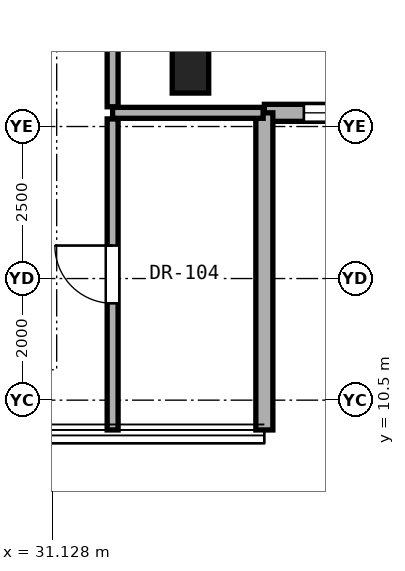
"""IFC4 building model, lengths in metres.
Left out: names, types, materials, properties, quantities, classifications, styles, units other than length and angle.
Written with IfcOpenShell. Run it as: python <this file> out.ifc"""

import sys

from ifc_helpers import new_model, si_unit, direction, frame, frame_2d, origin, origin_2d, place, context, subcontext, project, spatial, rectangle, extrude, element, fill, save


model = new_model("IFC4")
c1 = context("Model", 3, precision=1e-05, world=origin(), true_north=direction((0.0, 1.0)))
c2 = subcontext(c1, "Body", "Model", "MODEL_VIEW")
j1 = project(units=[si_unit("LENGTHUNIT", "METRE"), si_unit("PLANEANGLEUNIT", "RADIAN")], contexts=[c1])
p1 = place(None, origin())
s1 = spatial("IfcSite", under=j1, at=p1, CompositionType="ELEMENT")
p2 = place(p1, origin())
s2 = spatial("IfcBuilding", under=s1, at=p2, CompositionType="ELEMENT")
p3 = place(p2, frame((0.0, 0.0, 183.65)))
s3 = spatial("IfcBuildingStorey", under=s2, at=p3, CompositionType="ELEMENT", Elevation=183.65)
p4 = place(p3, frame((33.4, 16.0, 0.0), z_axis=(0.0, 0.0, 1.0), x_axis=(1.0, 0.0, 0.0)))
e1 = element("IfcColumn", 1, at=p4, inside=s3, PredefinedType="PILASTER", context=c2, shape_type="SweptSolid", body=[
    extrude(rectangle(XDim=0.6, YDim=0.9, at=origin_2d()), origin(), (0.0, 0.0, 1.0), 3.25),
])
p5 = place(p3, frame((34.615, 15.225, 0.0), z_axis=(0.0, 0.0, 1.0), x_axis=(1.0, 0.0, 0.0)))
e2 = element("IfcWall", 2, at=p5, inside=s3, PredefinedType="SOLIDWALL", context=c2, shape_type="SweptSolid", body=[
    extrude(rectangle(XDim=5.215, YDim=0.28, at=frame_2d((2.607, 0.0))), origin(), (0.0, 0.0, 1.0), 3.03),
])
p6 = place(p5, frame((0.65, 0.0, 0.85)))
e3 = element("IfcOpeningElement", 3, at=p6, cuts=e2, PredefinedType="OPENING", context=c2, shape_type="SweptSolid", body=[
    extrude(rectangle(XDim=1.1, YDim=2.0, at=frame_2d((0.55, 1.0))), frame((0.0, 0.15, 0.0), z_axis=(0.0, -1.0, 0.0), x_axis=(1.0, 0.0, 0.0)), (0.0, 0.0, 1.0), 0.3),
])
p7 = place(p3, frame((34.615, 10.01, 0.0), z_axis=(0.0, 0.0, 1.0), x_axis=(0.0, 1.0, 0.0)))
e4 = element("IfcWall", 4, at=p7, inside=s3, PredefinedType="SOLIDWALL", context=c2, shape_type="SweptSolid", body=[
    extrude(rectangle(XDim=5.215, YDim=0.28, at=frame_2d((2.607, 0.0))), origin(), (0.0, 0.0, 1.0), 3.03),
])
p8 = place(p3, frame((32.12, 15.225, 0.0), z_axis=(0.0, 0.0, 1.0), x_axis=(1.0, 0.0, 0.0)))
e5 = element("IfcWall", 5, at=p8, inside=s3, PredefinedType="PARTITIONING", context=c2, shape_type="SweptSolid", body=[
    extrude(rectangle(XDim=2.475, YDim=0.18, at=frame_2d((1.237, 0.0))), origin(), (0.0, 0.0, 1.0), 3.05),
])
p9 = place(p3, frame((32.12, 10.01, 0.0), z_axis=(0.0, 0.0, 1.0), x_axis=(0.0, 1.0, 0.0)))
e6 = element("IfcWall", 6, at=p9, inside=s3, PredefinedType="PARTITIONING", context=c2, shape_type="SweptSolid", body=[
    extrude(rectangle(XDim=5.115, YDim=0.18, at=frame_2d((2.558, 0.0))), origin(), (0.0, 0.0, 1.0), 3.05),
])
p10 = place(p9, frame((2.083, 0.0, 0.0)))
e7 = element("IfcOpeningElement", 7, at=p10, cuts=e6, PredefinedType="OPENING", context=c2, shape_type="SweptSolid", body=[
    extrude(rectangle(XDim=0.95, YDim=2.15, at=frame_2d((0.475, 1.075))), frame((0.0, 0.1, 0.0), z_axis=(0.0, -1.0, 0.0), x_axis=(1.0, 0.0, 0.0)), (0.0, 0.0, 1.0), 0.2),
])
p11 = place(p3, frame((32.12, 15.325, 0.0), z_axis=(0.0, 0.0, 1.0), x_axis=(0.0, 1.0, 0.0)))
e8 = element("IfcWall", 8, at=p11, inside=s3, PredefinedType="PARTITIONING", context=c2, shape_type="SweptSolid", body=[
    extrude(rectangle(XDim=7.785, YDim=0.18, at=frame_2d((3.893, 0.0))), origin(), (0.0, 0.0, 1.0), 2.442),
])
p12 = place(p11, frame((3.367, 0.0, 0.0)))
e9 = element("IfcOpeningElement", 9, at=p12, cuts=e8, PredefinedType="OPENING", context=c2, shape_type="SweptSolid", body=[
    extrude(rectangle(XDim=1.05, YDim=2.2, at=frame_2d((0.525, 1.1))), frame((0.0, 0.1, 0.0), z_axis=(0.0, -1.0, 0.0), x_axis=(1.0, 0.0, 0.0)), (0.0, 0.0, 1.0), 0.2),
])
p13 = place(p6, origin())
e10 = element("IfcWindow", 10, at=p13, inside=s3, PartitioningType="SINGLE_PANEL", PredefinedType="WINDOW", context=c2, shape_type="SweptSolid", body=[
    extrude(rectangle(XDim=1.1, YDim=2.0, at=frame_2d((0.55, 1.0))), frame((0.0, 0.03, 0.0), z_axis=(0.0, -1.0, 0.0), x_axis=(1.0, 0.0, 0.0)), (0.0, 0.0, 1.0), 0.06),
])
fill(e3, e10)
p14 = place(p10, origin())
e11 = element("IfcDoor", 11, at=p14, inside=s3, OperationType="SINGLE_SWING_RIGHT", PredefinedType="DOOR", context=c2, shape_type="SweptSolid", body=[
    extrude(rectangle(XDim=0.95, YDim=2.15, at=frame_2d((0.475, 1.075))), frame((0.0, 0.025, 0.0), z_axis=(0.0, -1.0, 0.0), x_axis=(1.0, 0.0, 0.0)), (0.0, 0.0, 1.0), 0.05),
])
fill(e7, e11)
save(model, sys.argv[1])
